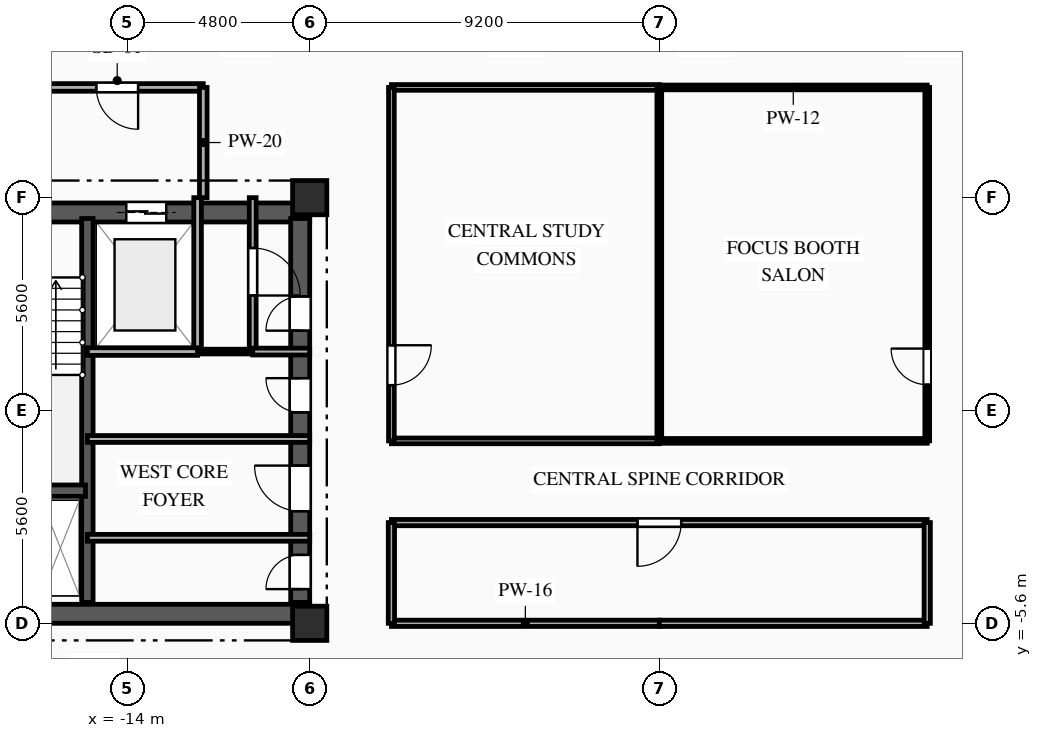
"""IFC4 building model, lengths in metres.
Left out: names, types, materials, properties, quantities, classifications, styles, units other than length and angle.
Written with IfcOpenShell. Run it as: python <this file> out.ifc"""

import sys

from ifc_helpers import new_model, si_unit, direction, frame, frame_2d, origin, origin_2d, place, context, subcontext, project, spatial, rectangle, extrude, element, fill, save


model = new_model("IFC4")
c1 = context("Model", 3, precision=1e-05, world=origin(), true_north=direction((0.0, 1.0)))
c2 = subcontext(c1, "Body", "Model", "MODEL_VIEW")
j1 = project(units=[si_unit("LENGTHUNIT", "METRE"), si_unit("PLANEANGLEUNIT", "RADIAN")], contexts=[c1])
p1 = place(None, origin())
s1 = spatial("IfcSite", under=j1, at=p1, CompositionType="ELEMENT")
p2 = place(p1, origin())
s2 = spatial("IfcBuilding", under=s1, at=p2, CompositionType="ELEMENT")
p3 = place(p2, frame((0.0, 0.0, 134.35)))
s3 = spatial("IfcBuildingStorey", under=s2, at=p3, CompositionType="ELEMENT", Elevation=134.35)
for number, where, z_axis, x_axis in (
    (1, (-9.2, -5.6, 0.0), (0.0, 0.0, 1.0), (1.0, 0.0, 0.0)),
    (2, (-9.2, 5.6, 0.0), (0.0, 0.0, 1.0), (1.0, 0.0, 0.0)),
):
    element("IfcColumn", number, at=place(p3, frame(where, z_axis=z_axis, x_axis=x_axis)), inside=s3, PredefinedType="COLUMN", context=c2, shape_type="SweptSolid", body=[
        extrude(rectangle(XDim=0.9, YDim=0.9, at=origin_2d()), origin(), (0.0, 0.0, 1.0), 3.35),
    ])
p4 = place(p3, frame((-18.8, 5.21, 0.0), z_axis=(0.0, 0.0, 1.0), x_axis=(1.0, 0.0, 0.0)))
e3 = element("IfcWall", 3, at=p4, inside=s3, PredefinedType="SHEAR", context=c2, shape_type="SweptSolid", body=[
    extrude(rectangle(XDim=9.6, YDim=0.5, at=frame_2d((4.8, 0.0))), origin(), (0.0, 0.0, 1.0), 3.04),
])
p5 = place(p4, frame((1.55, 0.0, 0.0)))
e4 = element("IfcOpeningElement", 4, at=p5, cuts=e3, PredefinedType="OPENING", context=c2, shape_type="SweptSolid", body=[
    extrude(rectangle(XDim=1.1, YDim=2.15, at=frame_2d((0.55, 1.075))), frame((0.0, 0.26, 0.0), z_axis=(0.0, -1.0, 0.0), x_axis=(1.0, 0.0, 0.0)), (0.0, 0.0, 1.0), 0.52),
])
p6 = place(p4, frame((4.775, 0.0, 0.0)))
e5 = element("IfcOpeningElement", 5, at=p6, cuts=e3, PredefinedType="OPENING", context=c2, shape_type="SweptSolid", body=[
    extrude(rectangle(XDim=1.05, YDim=2.1, at=frame_2d((0.525, 1.05))), frame((0.0, 0.26, 0.0), z_axis=(0.0, -1.0, 0.0), x_axis=(1.0, 0.0, 0.0)), (0.0, 0.0, 1.0), 0.52),
])
p7 = place(p3, frame((-18.8, -5.35, 0.0), z_axis=(0.0, 0.0, 1.0), x_axis=(1.0, 0.0, 0.0)))
e6 = element("IfcWall", 6, at=p7, inside=s3, PredefinedType="SHEAR", context=c2, shape_type="SweptSolid", body=[
    extrude(rectangle(XDim=9.6, YDim=0.5, at=frame_2d((4.8, 0.0))), origin(), (0.0, 0.0, 1.0), 3.04),
])
p8 = place(p7, frame((1.05, 0.0, 0.0)))
e7 = element("IfcOpeningElement", 7, at=p8, cuts=e6, PredefinedType="OPENING", context=c2, shape_type="SweptSolid", body=[
    extrude(rectangle(XDim=0.9, YDim=2.1, at=frame_2d((0.45, 1.05))), frame((0.0, 0.26, 0.0), z_axis=(0.0, -1.0, 0.0), x_axis=(1.0, 0.0, 0.0)), (0.0, 0.0, 1.0), 0.52),
])
p9 = place(p3, frame((-9.45, -5.05, 0.0), z_axis=(0.0, 0.0, 1.0), x_axis=(0.0, 1.0, 0.0)))
e8 = element("IfcWall", 8, at=p9, inside=s3, PredefinedType="SHEAR", context=c2, shape_type="SweptSolid", body=[
    extrude(rectangle(XDim=10.1, YDim=0.5, at=frame_2d((5.05, 0.0))), origin(), (0.0, 0.0, 1.0), 3.04),
])
p10 = place(p9, frame((7.15, 0.0, 0.0)))
e9 = element("IfcOpeningElement", 9, at=p10, cuts=e8, PredefinedType="OPENING", context=c2, shape_type="SweptSolid", body=[
    extrude(rectangle(XDim=0.9, YDim=2.1, at=frame_2d((0.45, 1.05))), frame((0.0, 0.26, 0.0), z_axis=(0.0, -1.0, 0.0), x_axis=(1.0, 0.0, 0.0)), (0.0, 0.0, 1.0), 0.52),
])
p11 = place(p9, frame((2.4, 0.0, 0.0)))
e10 = element("IfcOpeningElement", 10, at=p11, cuts=e8, PredefinedType="OPENING", context=c2, shape_type="SweptSolid", body=[
    extrude(rectangle(XDim=1.2, YDim=2.15, at=frame_2d((0.6, 1.075))), frame((0.0, 0.26, 0.0), z_axis=(0.0, -1.0, 0.0), x_axis=(1.0, 0.0, 0.0)), (0.0, 0.0, 1.0), 0.52),
])
p12 = place(p9, frame((0.35, 0.0, 0.0)))
e11 = element("IfcOpeningElement", 11, at=p12, cuts=e8, PredefinedType="OPENING", context=c2, shape_type="SweptSolid", body=[
    extrude(rectangle(XDim=0.9, YDim=2.1, at=frame_2d((0.45, 1.05))), frame((0.0, 0.26, 0.0), z_axis=(0.0, -1.0, 0.0), x_axis=(1.0, 0.0, 0.0)), (0.0, 0.0, 1.0), 0.52),
])
p13 = place(p9, frame((5.0, 0.0, 0.0)))
e12 = element("IfcOpeningElement", 12, at=p13, cuts=e8, PredefinedType="OPENING", context=c2, shape_type="SweptSolid", body=[
    extrude(rectangle(XDim=0.9, YDim=2.1, at=frame_2d((0.45, 1.05))), frame((0.0, 0.26, 0.0), z_axis=(0.0, -1.0, 0.0), x_axis=(1.0, 0.0, 0.0)), (0.0, 0.0, 1.0), 0.52),
])
p14 = place(p3, frame((-15.05, -5.05, 0.0), z_axis=(0.0, 0.0, 1.0), x_axis=(0.0, 1.0, 0.0)))
e13 = element("IfcWall", 13, at=p14, inside=s3, PredefinedType="SHEAR", context=c2, shape_type="SweptSolid", body=[
    extrude(rectangle(XDim=10.1, YDim=0.3, at=frame_2d((5.05, 0.0))), origin(), (0.0, 0.0, 1.0), 3.04),
])
p15 = place(p3, frame((-18.28, -2.11, 0.0), z_axis=(0.0, 0.0, 1.0), x_axis=(1.0, 0.0, 0.0)))
e14 = element("IfcWall", 14, at=p15, inside=s3, PredefinedType="SHEAR", context=c2, shape_type="SweptSolid", body=[
    extrude(rectangle(XDim=3.18, YDim=0.3, at=frame_2d((1.59, 0.0))), origin(), (0.0, 0.0, 1.0), 3.04),
])
p16 = place(p3, frame((-12.15, 1.55, 0.0), z_axis=(0.0, 0.0, 1.0), x_axis=(0.0, 1.0, 0.0)))
e15 = element("IfcWall", 15, at=p16, inside=s3, PredefinedType="PARTITIONING", context=c2, shape_type="SweptSolid", body=[
    extrude(rectangle(XDim=4.05, YDim=0.2, at=frame_2d((2.025, 0.0))), origin(), (0.0, 0.0, 1.0), 3.04),
])
p17 = place(p3, frame((-12.0, 8.5, 0.0), z_axis=(0.0, 0.0, 1.0), x_axis=(-1.0, 0.0, 0.0)))
e16 = element("IfcWall", 16, at=p17, inside=s3, PredefinedType="PARTITIONING", context=c2, shape_type="SweptSolid", body=[
    extrude(rectangle(XDim=6.8, YDim=0.2, at=frame_2d((3.4, 0.0))), origin(), (0.0, 0.0, 1.0), 3.04),
])
p18 = place(p17, frame((1.715, 0.0, 0.0)))
e17 = element("IfcOpeningElement", 17, at=p18, cuts=e16, PredefinedType="OPENING", context=c2, shape_type="SweptSolid", body=[
    extrude(rectangle(XDim=1.1, YDim=2.15, at=frame_2d((0.55, 1.075))), frame((0.0, 0.11, 0.0), z_axis=(0.0, -1.0, 0.0), x_axis=(1.0, 0.0, 0.0)), (0.0, 0.0, 1.0), 0.22),
])
p19 = place(p3, frame((-12.0, 5.6, 0.0), z_axis=(0.0, 0.0, 1.0), x_axis=(0.0, 1.0, 0.0)))
e18 = element("IfcWall", 18, at=p19, inside=s3, PredefinedType="PARTITIONING", context=c2, shape_type="SweptSolid", body=[
    extrude(rectangle(XDim=2.9, YDim=0.2, at=frame_2d((1.45, 0.0))), origin(), (0.0, 0.0, 1.0), 3.04),
])
p20 = place(p3, frame((-10.7, 5.6, 0.0), z_axis=(0.0, 0.0, 1.0), x_axis=(0.0, -1.0, 0.0)))
e19 = element("IfcWall", 19, at=p20, inside=s3, PredefinedType="PARTITIONING", context=c2, shape_type="SweptSolid", body=[
    extrude(rectangle(XDim=4.05, YDim=0.18, at=frame_2d((2.025, 0.0))), origin(), (0.0, 0.0, 1.0), 3.04),
])
p21 = place(p20, frame((1.325, 0.0, 0.0)))
e20 = element("IfcOpeningElement", 20, at=p21, cuts=e19, PredefinedType="OPENING", context=c2, shape_type="SweptSolid", body=[
    extrude(rectangle(XDim=1.25, YDim=2.2, at=frame_2d((0.625, 1.1))), frame((0.0, 0.1, 0.0), z_axis=(0.0, -1.0, 0.0), x_axis=(1.0, 0.0, 0.0)), (0.0, 0.0, 1.0), 0.2),
])
p22 = place(p3, frame((-10.7, 1.55, 0.0), z_axis=(0.0, 0.0, 1.0), x_axis=(1.0, 0.0, 0.0)))
e21 = element("IfcWall", 21, at=p22, inside=s3, PredefinedType="PARTITIONING", context=c2, shape_type="SweptSolid", body=[
    extrude(rectangle(XDim=1.5, YDim=0.18, at=frame_2d((0.75, 0.0))), origin(), (0.0, 0.0, 1.0), 3.04),
])
p23 = place(p3, frame((-12.15, 1.55, 0.0), z_axis=(0.0, 0.0, 1.0), x_axis=(1.0, 0.0, 0.0)))
e22 = element("IfcWall", 22, at=p23, inside=s3, PredefinedType="PARTITIONING", context=c2, shape_type="SweptSolid", body=[
    extrude(rectangle(XDim=1.45, YDim=0.125, at=frame_2d((0.725, 0.0))), origin(), (0.0, 0.0, 1.0), 3.04),
])
p24 = place(p3, frame((-15.05, -3.35, 0.0), z_axis=(0.0, 0.0, 1.0), x_axis=(1.0, 0.0, 0.0)))
e23 = element("IfcWall", 23, at=p24, inside=s3, PredefinedType="PARTITIONING", context=c2, shape_type="SweptSolid", body=[
    extrude(rectangle(XDim=5.85, YDim=0.18, at=frame_2d((2.925, 0.0))), origin(), (0.0, 0.0, 1.0), 2.755),
])
p25 = place(p3, frame((-9.2, -0.75, 0.0), z_axis=(0.0, 0.0, 1.0), x_axis=(-1.0, 0.0, 0.0)))
e24 = element("IfcWall", 24, at=p25, inside=s3, PredefinedType="PARTITIONING", context=c2, shape_type="SweptSolid", body=[
    extrude(rectangle(XDim=5.85, YDim=0.18, at=frame_2d((2.925, 0.0))), origin(), (0.0, 0.0, 1.0), 3.04),
])
p26 = place(p3, frame((0.0, 8.5, 0.0), z_axis=(0.0, 0.0, 1.0), x_axis=(-1.0, 0.0, 0.0)))
e25 = element("IfcWall", 25, at=p26, inside=s3, PredefinedType="PARTITIONING", context=c2, shape_type="SweptSolid", body=[
    extrude(rectangle(XDim=7.05, YDim=0.15, at=frame_2d((3.525, 0.0))), origin(), (0.0, 0.0, 1.0), 3.04),
])
p27 = place(p3, frame((7.05, 8.5, 0.0), z_axis=(0.0, 0.0, 1.0), x_axis=(-1.0, 0.0, 0.0)))
e26 = element("IfcWall", 26, at=p27, inside=s3, PredefinedType="PARTITIONING", context=c2, shape_type="SweptSolid", body=[
    extrude(rectangle(XDim=7.05, YDim=0.125, at=frame_2d((3.525, 0.0))), origin(), (0.0, 0.0, 1.0), 3.04),
])
for number, where, z_axis, x_axis in (
    (27, (-7.05, -5.6, 0.0), (0.0, 0.0, 1.0), (1.0, 0.0, 0.0)),
    (28, (0.0, -5.6, 0.0), (0.0, 0.0, 1.0), (1.0, 0.0, 0.0)),
):
    element("IfcWall", number, at=place(p3, frame(where, z_axis=z_axis, x_axis=x_axis)), inside=s3, PredefinedType="PARTITIONING", context=c2, shape_type="SweptSolid", body=[
        extrude(rectangle(XDim=7.05, YDim=0.165, at=frame_2d((3.525, 0.0))), origin(), (0.0, 0.0, 1.0), 2.525),
    ])
p28 = place(p3, frame((-7.05, -0.8, 0.0), z_axis=(0.0, 0.0, 1.0), x_axis=(1.0, 0.0, 0.0)))
e29 = element("IfcWall", 29, at=p28, inside=s3, PredefinedType="PARTITIONING", context=c2, shape_type="SweptSolid", body=[
    extrude(rectangle(XDim=7.05, YDim=0.15, at=frame_2d((3.525, 0.0))), origin(), (0.0, 0.0, 1.0), 3.04),
])
p29 = place(p3, frame((0.0, -0.8, 0.0), z_axis=(0.0, 0.0, 1.0), x_axis=(1.0, 0.0, 0.0)))
e30 = element("IfcWall", 30, at=p29, inside=s3, PredefinedType="PARTITIONING", context=c2, shape_type="SweptSolid", body=[
    extrude(rectangle(XDim=7.05, YDim=0.125, at=frame_2d((3.525, 0.0))), origin(), (0.0, 0.0, 1.0), 3.04),
])
p30 = place(p3, frame((7.05, -2.95, 0.0), z_axis=(0.0, 0.0, 1.0), x_axis=(-1.0, 0.0, 0.0)))
e31 = element("IfcWall", 31, at=p30, inside=s3, PredefinedType="PARTITIONING", context=c2, shape_type="SweptSolid", body=[
    extrude(rectangle(XDim=14.1, YDim=0.165, at=frame_2d((7.05, 0.0))), origin(), (0.0, 0.0, 1.0), 3.04),
])
p31 = place(p30, frame((6.475, 0.0, 0.0)))
e32 = element("IfcOpeningElement", 32, at=p31, cuts=e31, PredefinedType="OPENING", context=c2, shape_type="SweptSolid", body=[
    extrude(rectangle(XDim=1.15, YDim=2.15, at=frame_2d((0.575, 1.075))), frame((0.0, 0.093, 0.0), z_axis=(0.0, -1.0, 0.0), x_axis=(1.0, 0.0, 0.0)), (0.0, 0.0, 1.0), 0.185),
])
p32 = place(p3, frame((-7.05, 8.5, 0.0), z_axis=(0.0, 0.0, 1.0), x_axis=(0.0, -1.0, 0.0)))
e33 = element("IfcWall", 33, at=p32, inside=s3, PredefinedType="PARTITIONING", context=c2, shape_type="SweptSolid", body=[
    extrude(rectangle(XDim=9.3, YDim=0.15, at=frame_2d((4.65, 0.0))), origin(), (0.0, 0.0, 1.0), 3.04),
])
p33 = place(p32, frame((6.784, 0.0, 0.0)))
e34 = element("IfcOpeningElement", 34, at=p33, cuts=e33, PredefinedType="OPENING", context=c2, shape_type="SweptSolid", body=[
    extrude(rectangle(XDim=1.05, YDim=2.15, at=frame_2d((0.525, 1.075))), frame((0.0, 0.085, 0.0), z_axis=(0.0, -1.0, 0.0), x_axis=(1.0, 0.0, 0.0)), (0.0, 0.0, 1.0), 0.17),
])
p34 = place(p3, frame((-7.05, -2.95, 0.0), z_axis=(0.0, 0.0, 1.0), x_axis=(0.0, -1.0, 0.0)))
e35 = element("IfcWall", 35, at=p34, inside=s3, PredefinedType="PARTITIONING", context=c2, shape_type="SweptSolid", body=[
    extrude(rectangle(XDim=2.65, YDim=0.165, at=frame_2d((1.325, 0.0))), origin(), (0.0, 0.0, 1.0), 3.04),
])
p35 = place(p3, frame((7.05, -0.8, 0.0), z_axis=(0.0, 0.0, 1.0), x_axis=(0.0, 1.0, 0.0)))
e36 = element("IfcWall", 36, at=p35, inside=s3, PredefinedType="PARTITIONING", context=c2, shape_type="SweptSolid", body=[
    extrude(rectangle(XDim=9.3, YDim=0.125, at=frame_2d((4.65, 0.0))), origin(), (0.0, 0.0, 1.0), 3.04),
])
p36 = place(p35, frame((1.479, 0.0, 0.0)))
e37 = element("IfcOpeningElement", 37, at=p36, cuts=e36, PredefinedType="OPENING", context=c2, shape_type="SweptSolid", body=[
    extrude(rectangle(XDim=0.95, YDim=2.1, at=frame_2d((0.475, 1.05))), frame((0.0, 0.073, 0.0), z_axis=(0.0, -1.0, 0.0), x_axis=(1.0, 0.0, 0.0)), (0.0, 0.0, 1.0), 0.145),
])
p37 = place(p3, frame((7.05, -5.6, 0.0), z_axis=(0.0, 0.0, 1.0), x_axis=(0.0, 1.0, 0.0)))
e38 = element("IfcWall", 38, at=p37, inside=s3, PredefinedType="PARTITIONING", context=c2, shape_type="SweptSolid", body=[
    extrude(rectangle(XDim=2.65, YDim=0.165, at=frame_2d((1.325, 0.0))), origin(), (0.0, 0.0, 1.0), 3.04),
])
p38 = place(p3, frame((0.0, 8.5, 0.0), z_axis=(0.0, 0.0, 1.0), x_axis=(0.0, -1.0, 0.0)))
e39 = element("IfcWall", 39, at=p38, inside=s3, PredefinedType="PARTITIONING", context=c2, shape_type="SweptSolid", body=[
    extrude(rectangle(XDim=9.3, YDim=0.125, at=frame_2d((4.65, 0.0))), origin(), (0.0, 0.0, 1.0), 3.04),
])
p39 = place(p3, frame((-15.05, 1.55, 0.0), z_axis=(0.0, 0.0, 1.0), x_axis=(1.0, 0.0, 0.0)))
e40 = element("IfcWall", 40, at=p39, inside=s3, PredefinedType="PARTITIONING", context=c2, shape_type="SweptSolid", body=[
    extrude(rectangle(XDim=2.9, YDim=0.2, at=frame_2d((1.45, 0.0))), origin(), (0.0, 0.0, 1.0), 3.04),
])
p40 = place(p6, origin())
e41 = element("IfcDoor", 41, at=p40, inside=s3, OperationType="DOUBLE_DOOR_SLIDING", PredefinedType="DOOR", context=c2, shape_type="SweptSolid", body=[
    extrude(rectangle(XDim=1.05, YDim=2.1, at=frame_2d((0.525, 1.05))), frame((0.0, 0.025, 0.0), z_axis=(0.0, -1.0, 0.0), x_axis=(1.0, 0.0, 0.0)), (0.0, 0.0, 1.0), 0.05),
])
fill(e5, e41)
p41 = place(p18, origin())
e42 = element("IfcDoor", 42, at=p41, inside=s3, OperationType="SINGLE_SWING_LEFT", PredefinedType="DOOR", context=c2, shape_type="SweptSolid", body=[
    extrude(rectangle(XDim=1.1, YDim=2.15, at=frame_2d((0.55, 1.075))), frame((0.0, 0.025, 0.0), z_axis=(0.0, -1.0, 0.0), x_axis=(1.0, 0.0, 0.0)), (0.0, 0.0, 1.0), 0.05),
])
fill(e17, e42)
p42 = place(p21, origin())
e43 = element("IfcDoor", 43, at=p42, inside=s3, OperationType="SINGLE_SWING_RIGHT", PredefinedType="DOOR", context=c2, shape_type="SweptSolid", body=[
    extrude(rectangle(XDim=1.25, YDim=2.2, at=frame_2d((0.625, 1.1))), frame((0.0, 0.025, 0.0), z_axis=(0.0, -1.0, 0.0), x_axis=(1.0, 0.0, 0.0)), (0.0, 0.0, 1.0), 0.05),
])
fill(e20, e43)
p43 = place(p10, origin())
e44 = element("IfcDoor", 44, at=p43, inside=s3, OperationType="SINGLE_SWING_LEFT", PredefinedType="DOOR", context=c2, shape_type="SweptSolid", body=[
    extrude(rectangle(XDim=0.9, YDim=2.1, at=frame_2d((0.45, 1.05))), frame((0.0, 0.025, 0.0), z_axis=(0.0, -1.0, 0.0), x_axis=(1.0, 0.0, 0.0)), (0.0, 0.0, 1.0), 0.05),
])
fill(e9, e44)
p44 = place(p11, origin())
e45 = element("IfcDoor", 45, at=p44, inside=s3, OperationType="SINGLE_SWING_RIGHT", PredefinedType="DOOR", context=c2, shape_type="SweptSolid", body=[
    extrude(rectangle(XDim=1.2, YDim=2.15, at=frame_2d((0.6, 1.075))), frame((0.0, 0.025, 0.0), z_axis=(0.0, -1.0, 0.0), x_axis=(1.0, 0.0, 0.0)), (0.0, 0.0, 1.0), 0.05),
])
fill(e10, e45)
p45 = place(p12, origin())
e46 = element("IfcDoor", 46, at=p45, inside=s3, OperationType="SINGLE_SWING_LEFT", PredefinedType="DOOR", context=c2, shape_type="SweptSolid", body=[
    extrude(rectangle(XDim=0.9, YDim=2.1, at=frame_2d((0.45, 1.05))), frame((0.0, 0.025, 0.0), z_axis=(0.0, -1.0, 0.0), x_axis=(1.0, 0.0, 0.0)), (0.0, 0.0, 1.0), 0.05),
])
fill(e11, e46)
p46 = place(p13, origin())
e47 = element("IfcDoor", 47, at=p46, inside=s3, OperationType="SINGLE_SWING_RIGHT", PredefinedType="DOOR", context=c2, shape_type="SweptSolid", body=[
    extrude(rectangle(XDim=0.9, YDim=2.1, at=frame_2d((0.45, 1.05))), frame((0.0, 0.025, 0.0), z_axis=(0.0, -1.0, 0.0), x_axis=(1.0, 0.0, 0.0)), (0.0, 0.0, 1.0), 0.05),
])
fill(e12, e47)
p47 = place(p31, origin())
e48 = element("IfcDoor", 48, at=p47, inside=s3, OperationType="SINGLE_SWING_RIGHT", PredefinedType="DOOR", context=c2, shape_type="SweptSolid", body=[
    extrude(rectangle(XDim=1.15, YDim=2.15, at=frame_2d((0.575, 1.075))), frame((0.0, 0.025, 0.0), z_axis=(0.0, -1.0, 0.0), x_axis=(1.0, 0.0, 0.0)), (0.0, 0.0, 1.0), 0.05),
])
fill(e32, e48)
p48 = place(p33, origin())
e49 = element("IfcDoor", 49, at=p48, inside=s3, OperationType="SINGLE_SWING_LEFT", PredefinedType="DOOR", context=c2, shape_type="SweptSolid", body=[
    extrude(rectangle(XDim=1.05, YDim=2.15, at=frame_2d((0.525, 1.075))), frame((0.0, 0.025, 0.0), z_axis=(0.0, -1.0, 0.0), x_axis=(1.0, 0.0, 0.0)), (0.0, 0.0, 1.0), 0.05),
])
fill(e34, e49)
p49 = place(p36, origin())
e50 = element("IfcDoor", 50, at=p49, inside=s3, OperationType="SINGLE_SWING_RIGHT", PredefinedType="DOOR", context=c2, shape_type="SweptSolid", body=[
    extrude(rectangle(XDim=0.95, YDim=2.1, at=frame_2d((0.475, 1.05))), frame((0.0, 0.025, 0.0), z_axis=(0.0, -1.0, 0.0), x_axis=(1.0, 0.0, 0.0)), (0.0, 0.0, 1.0), 0.05),
])
fill(e37, e50)
save(model, sys.argv[1])
